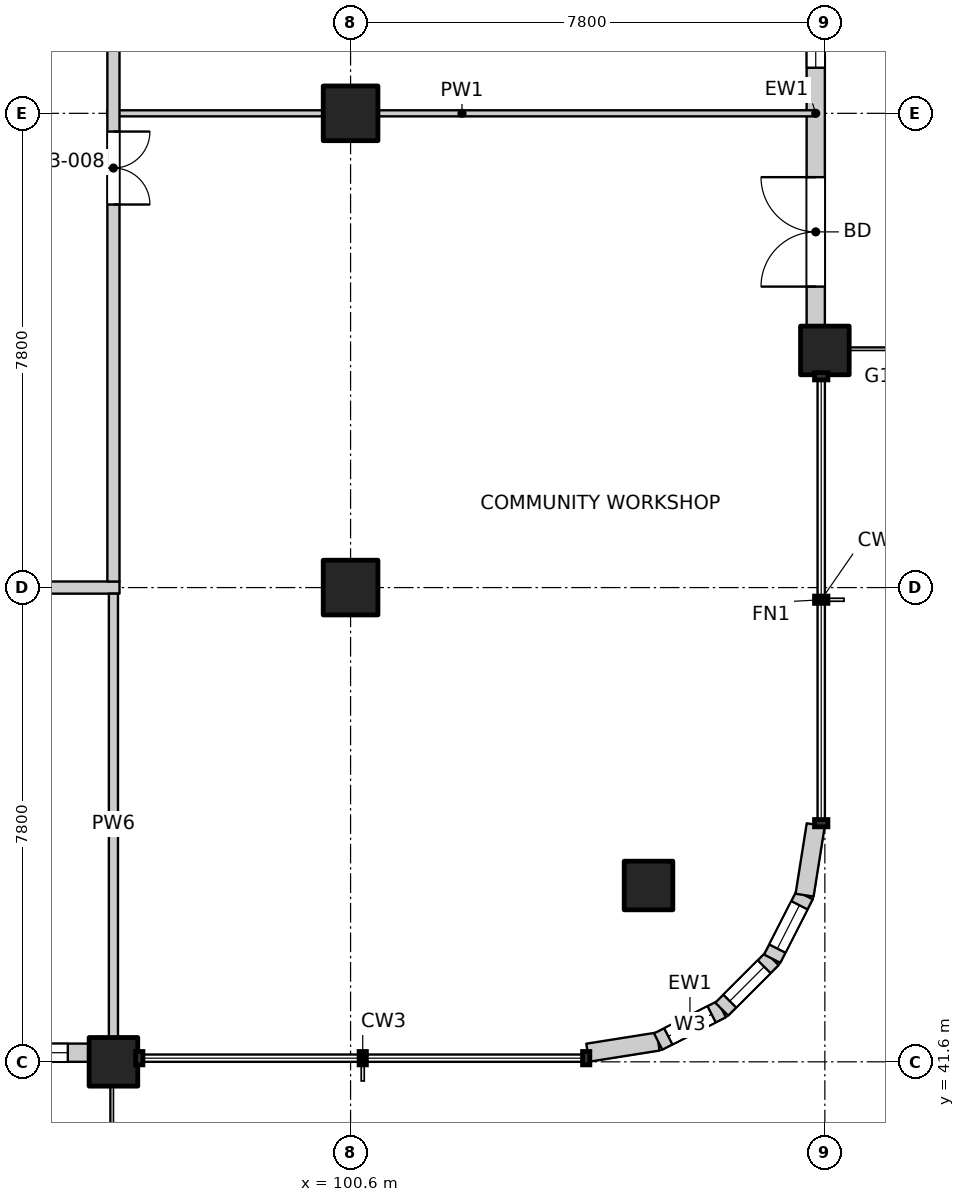
"""IFC4 building model, lengths in metres.
Left out: names, types, materials, properties, quantities, classifications, styles, units other than length and angle.
Written with IfcOpenShell. Run it as: python <this file> out.ifc"""

import sys

from ifc_helpers import new_model, si_unit, direction, frame, frame_2d, origin, origin_2d, place, context, subcontext, project, spatial, rectangle, extrude, element, fill, save


model = new_model("IFC4")
c1 = context("Model", 3, precision=1e-05, world=origin(), true_north=direction((0.0, 1.0)))
c2 = subcontext(c1, "Body", "Model", "MODEL_VIEW")
j1 = project(units=[si_unit("LENGTHUNIT", "METRE"), si_unit("PLANEANGLEUNIT", "RADIAN")], contexts=[c1])
p1 = place(None, origin())
s1 = spatial("IfcSite", under=j1, at=p1, CompositionType="ELEMENT")
p2 = place(p1, origin())
s2 = spatial("IfcBuilding", under=s1, at=p2, CompositionType="ELEMENT")
p3 = place(p2, frame((0.0, 0.0, 200.7)))
s3 = spatial("IfcBuildingStorey", under=s2, at=p3, CompositionType="ELEMENT", Elevation=200.7)
for number, where, z_axis, x_axis in (
    (1, (105.5, 44.5, -0.25), (0.0, 0.0, 1.0), (1.0, 0.0, 0.0)),
    (2, (108.4, 53.3, -0.25), (0.0, 0.0, 1.0), (1.0, 0.0, 0.0)),
    (3, (96.7, 41.6, -0.25), (0.0, 0.0, 1.0), (1.0, 0.0, 0.0)),
):
    element("IfcColumn", number, at=place(p3, frame(where, z_axis=z_axis, x_axis=x_axis)), inside=s3, PredefinedType="COLUMN", context=c2, shape_type="SweptSolid", body=[
        extrude(rectangle(XDim=0.8, YDim=0.8, at=origin_2d()), origin(), (0.0, 0.0, 1.0), 3.4),
    ])
for number, where, z_axis, x_axis in (
    (4, (100.6, 49.4, -0.25), (0.0, 0.0, 1.0), (1.0, 0.0, 0.0)),
    (5, (100.6, 57.2, -0.25), (0.0, 0.0, 1.0), (1.0, 0.0, 0.0)),
):
    element("IfcColumn", number, at=place(p3, frame(where, z_axis=z_axis, x_axis=x_axis)), inside=s3, PredefinedType="COLUMN", context=c2, shape_type="SweptSolid", body=[
        extrude(rectangle(XDim=0.9, YDim=0.9, at=origin_2d()), origin(), (0.0, 0.0, 1.0), 3.4),
    ])
p4 = place(p3, frame((89.3, 41.75, 0.0), z_axis=(0.0, 0.0, 1.0), x_axis=(1.0, 0.0, 0.0)))
e6 = element("IfcWall", 6, at=p4, inside=s3, PredefinedType="SOLIDWALL", context=c2, shape_type="SweptSolid", body=[
    extrude(rectangle(XDim=7.0, YDim=0.3, at=frame_2d((3.5, 0.0))), origin(), (0.0, 0.0, 1.0), 2.7),
])
p5 = place(p4, frame((0.65, 0.0, 0.0)))
e7 = element("IfcOpeningElement", 7, at=p5, cuts=e6, PredefinedType="OPENING", context=c2, shape_type="SweptSolid", body=[
    extrude(rectangle(XDim=1.8, YDim=2.4, at=frame_2d((0.9, 1.2))), frame((0.0, 0.16, 0.0), z_axis=(0.0, -1.0, 0.0), x_axis=(1.0, 0.0, 0.0)), (0.0, 0.0, 1.0), 0.32),
])
p6 = place(p4, frame((4.25, 0.0, 0.6)))
e8 = element("IfcOpeningElement", 8, at=p6, cuts=e6, PredefinedType="OPENING", context=c2, shape_type="SweptSolid", body=[
    extrude(rectangle(XDim=2.4, YDim=2.1, at=frame_2d((1.2, 1.05))), frame((0.0, 0.16, 0.0), z_axis=(0.0, -1.0, 0.0), x_axis=(1.0, 0.0, 0.0)), (0.0, 0.0, 1.0), 0.32),
])
p7 = place(p3, frame((108.25, 53.7, 0.0), z_axis=(0.0, 0.0, 1.0), x_axis=(0.0, 1.0, 0.0)))
e9 = element("IfcWall", 9, at=p7, inside=s3, PredefinedType="SOLIDWALL", context=c2, shape_type="SweptSolid", body=[
    extrude(rectangle(XDim=7.0, YDim=0.3, at=frame_2d((3.5, 0.0))), origin(), (0.0, 0.0, 1.0), 2.7),
])
p8 = place(p7, frame((0.65, 0.0, 0.0)))
e10 = element("IfcOpeningElement", 10, at=p8, cuts=e9, PredefinedType="OPENING", context=c2, shape_type="SweptSolid", body=[
    extrude(rectangle(XDim=1.8, YDim=2.4, at=frame_2d((0.9, 1.2))), frame((0.0, 0.16, 0.0), z_axis=(0.0, -1.0, 0.0), x_axis=(1.0, 0.0, 0.0)), (0.0, 0.0, 1.0), 0.32),
])
p9 = place(p7, frame((4.25, 0.0, 0.6)))
e11 = element("IfcOpeningElement", 11, at=p9, cuts=e9, PredefinedType="OPENING", context=c2, shape_type="SweptSolid", body=[
    extrude(rectangle(XDim=2.4, YDim=2.1, at=frame_2d((1.2, 1.05))), frame((0.0, 0.16, 0.0), z_axis=(0.0, -1.0, 0.0), x_axis=(1.0, 0.0, 0.0)), (0.0, 0.0, 1.0), 0.32),
])
p10 = place(p3, frame((104.5, 41.75, 0.0), z_axis=(0.0, 0.0, 1.0), x_axis=(0.987678452879, 0.156496880861, 0.0)))
e12 = element("IfcWall", 12, at=p10, inside=s3, PredefinedType="SOLIDWALL", context=c2, shape_type="SweptSolid", body=[
    extrude(rectangle(XDim=1.173, YDim=0.3, at=frame_2d((0.586, 0.0))), origin(), (0.0, 0.0, 1.0), 2.7),
])
p11 = place(p3, frame((105.659, 41.934, 0.0), z_axis=(0.0, 0.0, 1.0), x_axis=(0.890988677504, 0.454025524128, 0.0)))
e13 = element("IfcWall", 13, at=p11, inside=s3, PredefinedType="SOLIDWALL", context=c2, shape_type="SweptSolid", body=[
    extrude(rectangle(XDim=1.173, YDim=0.3, at=frame_2d((0.587, 0.0))), origin(), (0.0, 0.0, 1.0), 2.7),
])
p12 = place(p11, frame((0.187, 0.0, 0.9)))
e14 = element("IfcOpeningElement", 14, at=p12, cuts=e13, PredefinedType="OPENING", context=c2, shape_type="SweptSolid", body=[
    extrude(rectangle(XDim=0.8, YDim=1.2, at=frame_2d((0.4, 0.6))), frame((0.0, 0.16, 0.0), z_axis=(0.0, -1.0, 0.0), x_axis=(1.0, 0.0, 0.0)), (0.0, 0.0, 1.0), 0.32),
])
p13 = place(p3, frame((106.704, 42.466, 0.0), z_axis=(0.0, 0.0, 1.0), x_axis=(0.707106781187, 0.707106781187, 0.0)))
e15 = element("IfcWall", 15, at=p13, inside=s3, PredefinedType="SOLIDWALL", context=c2, shape_type="SweptSolid", body=[
    extrude(rectangle(XDim=1.173, YDim=0.3, at=frame_2d((0.586, 0.0))), origin(), (0.0, 0.0, 1.0), 2.7),
])
p14 = place(p13, frame((0.187, 0.0, 0.9)))
e16 = element("IfcOpeningElement", 16, at=p14, cuts=e15, PredefinedType="OPENING", context=c2, shape_type="SweptSolid", body=[
    extrude(rectangle(XDim=0.8, YDim=1.2, at=frame_2d((0.4, 0.6))), frame((0.0, 0.16, 0.0), z_axis=(0.0, -1.0, 0.0), x_axis=(1.0, 0.0, 0.0)), (0.0, 0.0, 1.0), 0.32),
])
p15 = place(p3, frame((107.534, 43.296, 0.0), z_axis=(0.0, 0.0, 1.0), x_axis=(0.454025524128, 0.890988677504, 0.0)))
e17 = element("IfcWall", 17, at=p15, inside=s3, PredefinedType="SOLIDWALL", context=c2, shape_type="SweptSolid", body=[
    extrude(rectangle(XDim=1.173, YDim=0.3, at=frame_2d((0.587, 0.0))), origin(), (0.0, 0.0, 1.0), 2.7),
])
p16 = place(p15, frame((0.187, 0.0, 0.9)))
e18 = element("IfcOpeningElement", 18, at=p16, cuts=e17, PredefinedType="OPENING", context=c2, shape_type="SweptSolid", body=[
    extrude(rectangle(XDim=0.8, YDim=1.2, at=frame_2d((0.4, 0.6))), frame((0.0, 0.16, 0.0), z_axis=(0.0, -1.0, 0.0), x_axis=(1.0, 0.0, 0.0)), (0.0, 0.0, 1.0), 0.32),
])
p17 = place(p3, frame((108.066, 44.341, 0.0), z_axis=(0.0, 0.0, 1.0), x_axis=(0.156496880861, 0.987678452879, 0.0)))
e19 = element("IfcWall", 19, at=p17, inside=s3, PredefinedType="SOLIDWALL", context=c2, shape_type="SweptSolid", body=[
    extrude(rectangle(XDim=1.173, YDim=0.3, at=frame_2d((0.586, 0.0))), origin(), (0.0, 0.0, 1.0), 2.7),
])
p18 = place(p3, frame((73.2, 49.4, 0.0), z_axis=(0.0, 0.0, 1.0), x_axis=(1.0, 0.0, 0.0)))
e20 = element("IfcWall", 20, at=p18, inside=s3, PredefinedType="PARTITIONING", context=c2, shape_type="SweptSolid", body=[
    extrude(rectangle(XDim=23.6, YDim=0.2, at=frame_2d((11.8, 0.0))), origin(), (0.0, 0.0, 1.0), 3.15),
])
p19 = place(p18, frame((2.25, 0.0, 0.0)))
e21 = element("IfcOpeningElement", 21, at=p19, cuts=e20, PredefinedType="OPENING", context=c2, shape_type="SweptSolid", body=[
    extrude(rectangle(XDim=1.2, YDim=2.1, at=frame_2d((0.6, 1.05))), frame((0.0, 0.11, 0.0), z_axis=(0.0, -1.0, 0.0), x_axis=(1.0, 0.0, 0.0)), (0.0, 0.0, 1.0), 0.22),
])
p20 = place(p18, frame((12.375, 0.0, 0.0)))
e22 = element("IfcOpeningElement", 22, at=p20, cuts=e20, PredefinedType="OPENING", context=c2, shape_type="SweptSolid", body=[
    extrude(rectangle(XDim=1.2, YDim=2.1, at=frame_2d((0.6, 1.05))), frame((0.0, 0.11, 0.0), z_axis=(0.0, -1.0, 0.0), x_axis=(1.0, 0.0, 0.0)), (0.0, 0.0, 1.0), 0.22),
])
p21 = place(p18, frame((20.15, 0.0, 0.0)))
e23 = element("IfcOpeningElement", 23, at=p21, cuts=e20, PredefinedType="OPENING", context=c2, shape_type="SweptSolid", body=[
    extrude(rectangle(XDim=1.2, YDim=2.1, at=frame_2d((0.6, 1.05))), frame((0.0, 0.11, 0.0), z_axis=(0.0, -1.0, 0.0), x_axis=(1.0, 0.0, 0.0)), (0.0, 0.0, 1.0), 0.22),
])
p22 = place(p3, frame((96.6, 57.2, 0.0), z_axis=(0.0, 0.0, 1.0), x_axis=(1.0, 0.0, 0.0)))
e24 = element("IfcWall", 24, at=p22, inside=s3, PredefinedType="PARTITIONING", context=c2, shape_type="SweptSolid", body=[
    extrude(rectangle(XDim=11.665, YDim=0.1, at=frame_2d((5.833, 0.0))), origin(), (0.0, 0.0, 1.0), 3.15),
])
p23 = place(p3, frame((96.7, 41.735, 0.0), z_axis=(0.0, 0.0, 1.0), x_axis=(0.0, 1.0, 0.0)))
e25 = element("IfcWall", 25, at=p23, inside=s3, PredefinedType="PARTITIONING", context=c2, shape_type="SweptSolid", body=[
    extrude(rectangle(XDim=7.565, YDim=0.15, at=frame_2d((3.782, 0.0))), origin(), (0.0, 0.0, 1.0), 3.15),
])
p24 = place(p3, frame((96.7, 49.5, 0.0), z_axis=(0.0, 0.0, 1.0), x_axis=(0.0, 1.0, 0.0)))
e26 = element("IfcWall", 26, at=p24, inside=s3, PredefinedType="PARTITIONING", context=c2, shape_type="SweptSolid", body=[
    extrude(rectangle(XDim=34.9, YDim=0.2, at=frame_2d((17.45, 0.0))), origin(), (0.0, 0.0, 1.0), 3.15),
])
p25 = place(p24, frame((6.2, 0.0, 0.0)))
e27 = element("IfcOpeningElement", 27, at=p25, cuts=e26, PredefinedType="OPENING", context=c2, shape_type="SweptSolid", body=[
    extrude(rectangle(XDim=1.2, YDim=2.1, at=frame_2d((0.6, 1.05))), frame((0.0, 0.11, 0.0), z_axis=(0.0, -1.0, 0.0), x_axis=(1.0, 0.0, 0.0)), (0.0, 0.0, 1.0), 0.22),
])
p26 = place(p24, frame((12.95, 0.0, 0.0)))
e28 = element("IfcOpeningElement", 28, at=p26, cuts=e26, PredefinedType="OPENING", context=c2, shape_type="SweptSolid", body=[
    extrude(rectangle(XDim=1.2, YDim=2.1, at=frame_2d((0.6, 1.05))), frame((0.0, 0.11, 0.0), z_axis=(0.0, -1.0, 0.0), x_axis=(1.0, 0.0, 0.0)), (0.0, 0.0, 1.0), 0.22),
])
p27 = place(p24, frame((18.7, 0.0, 0.0)))
e29 = element("IfcOpeningElement", 29, at=p27, cuts=e26, PredefinedType="OPENING", context=c2, shape_type="SweptSolid", body=[
    extrude(rectangle(XDim=1.2, YDim=2.1, at=frame_2d((0.6, 1.05))), frame((0.0, 0.11, 0.0), z_axis=(0.0, -1.0, 0.0), x_axis=(1.0, 0.0, 0.0)), (0.0, 0.0, 1.0), 0.22),
])
p28 = place(p24, frame((24.65, 0.0, 0.0)))
e30 = element("IfcOpeningElement", 30, at=p28, cuts=e26, PredefinedType="OPENING", context=c2, shape_type="SweptSolid", body=[
    extrude(rectangle(XDim=1.2, YDim=2.1, at=frame_2d((0.6, 1.05))), frame((0.0, 0.11, 0.0), z_axis=(0.0, -1.0, 0.0), x_axis=(1.0, 0.0, 0.0)), (0.0, 0.0, 1.0), 0.22),
])
p29 = place(p24, frame((32.45, 0.0, 0.0)))
e31 = element("IfcOpeningElement", 31, at=p29, cuts=e26, PredefinedType="OPENING", context=c2, shape_type="SweptSolid", body=[
    extrude(rectangle(XDim=1.2, YDim=2.1, at=frame_2d((0.6, 1.05))), frame((0.0, 0.11, 0.0), z_axis=(0.0, -1.0, 0.0), x_axis=(1.0, 0.0, 0.0)), (0.0, 0.0, 1.0), 0.22),
])
p30 = place(p6, origin())
e32 = element("IfcWindow", 32, at=p30, inside=s3, PartitioningType="SINGLE_PANEL", PredefinedType="WINDOW", context=c2, shape_type="SweptSolid", body=[
    extrude(rectangle(XDim=2.4, YDim=2.1, at=frame_2d((1.2, 1.05))), frame((0.0, 0.03, 0.0), z_axis=(0.0, -1.0, 0.0), x_axis=(1.0, 0.0, 0.0)), (0.0, 0.0, 1.0), 0.06),
])
fill(e8, e32)
p31 = place(p8, origin())
e33 = element("IfcDoor", 33, at=p31, inside=s3, OperationType="DOUBLE_DOOR_SINGLE_SWING", PredefinedType="DOOR", context=c2, shape_type="SweptSolid", body=[
    extrude(rectangle(XDim=1.8, YDim=2.4, at=frame_2d((0.9, 1.2))), frame((0.0, 0.025, 0.0), z_axis=(0.0, -1.0, 0.0), x_axis=(1.0, 0.0, 0.0)), (0.0, 0.0, 1.0), 0.05),
])
fill(e10, e33)
p32 = place(p9, origin())
e34 = element("IfcWindow", 34, at=p32, inside=s3, PartitioningType="SINGLE_PANEL", PredefinedType="WINDOW", context=c2, shape_type="SweptSolid", body=[
    extrude(rectangle(XDim=2.4, YDim=2.1, at=frame_2d((1.2, 1.05))), frame((0.0, 0.03, 0.0), z_axis=(0.0, -1.0, 0.0), x_axis=(1.0, 0.0, 0.0)), (0.0, 0.0, 1.0), 0.06),
])
fill(e11, e34)
p33 = place(p12, origin())
e35 = element("IfcWindow", 35, at=p33, inside=s3, PartitioningType="SINGLE_PANEL", PredefinedType="WINDOW", context=c2, shape_type="SweptSolid", body=[
    extrude(rectangle(XDim=0.8, YDim=1.2, at=frame_2d((0.4, 0.6))), frame((0.0, 0.03, 0.0), z_axis=(0.0, -1.0, 0.0), x_axis=(1.0, 0.0, 0.0)), (0.0, 0.0, 1.0), 0.06),
])
fill(e14, e35)
p34 = place(p14, origin())
e36 = element("IfcWindow", 36, at=p34, inside=s3, PartitioningType="SINGLE_PANEL", PredefinedType="WINDOW", context=c2, shape_type="SweptSolid", body=[
    extrude(rectangle(XDim=0.8, YDim=1.2, at=frame_2d((0.4, 0.6))), frame((0.0, 0.03, 0.0), z_axis=(0.0, -1.0, 0.0), x_axis=(1.0, 0.0, 0.0)), (0.0, 0.0, 1.0), 0.06),
])
fill(e16, e36)
p35 = place(p16, origin())
e37 = element("IfcWindow", 37, at=p35, inside=s3, PartitioningType="SINGLE_PANEL", PredefinedType="WINDOW", context=c2, shape_type="SweptSolid", body=[
    extrude(rectangle(XDim=0.8, YDim=1.2, at=frame_2d((0.4, 0.6))), frame((0.0, 0.03, 0.0), z_axis=(0.0, -1.0, 0.0), x_axis=(1.0, 0.0, 0.0)), (0.0, 0.0, 1.0), 0.06),
])
fill(e18, e37)
p36 = place(p25, origin())
e38 = element("IfcDoor", 38, at=p36, inside=s3, OperationType="DOUBLE_DOOR_SINGLE_SWING", PredefinedType="DOOR", context=c2, shape_type="SweptSolid", body=[
    extrude(rectangle(XDim=1.2, YDim=2.1, at=frame_2d((0.6, 1.05))), frame((0.0, 0.025, 0.0), z_axis=(0.0, -1.0, 0.0), x_axis=(1.0, 0.0, 0.0)), (0.0, 0.0, 1.0), 0.05),
])
fill(e27, e38)
save(model, sys.argv[1])
